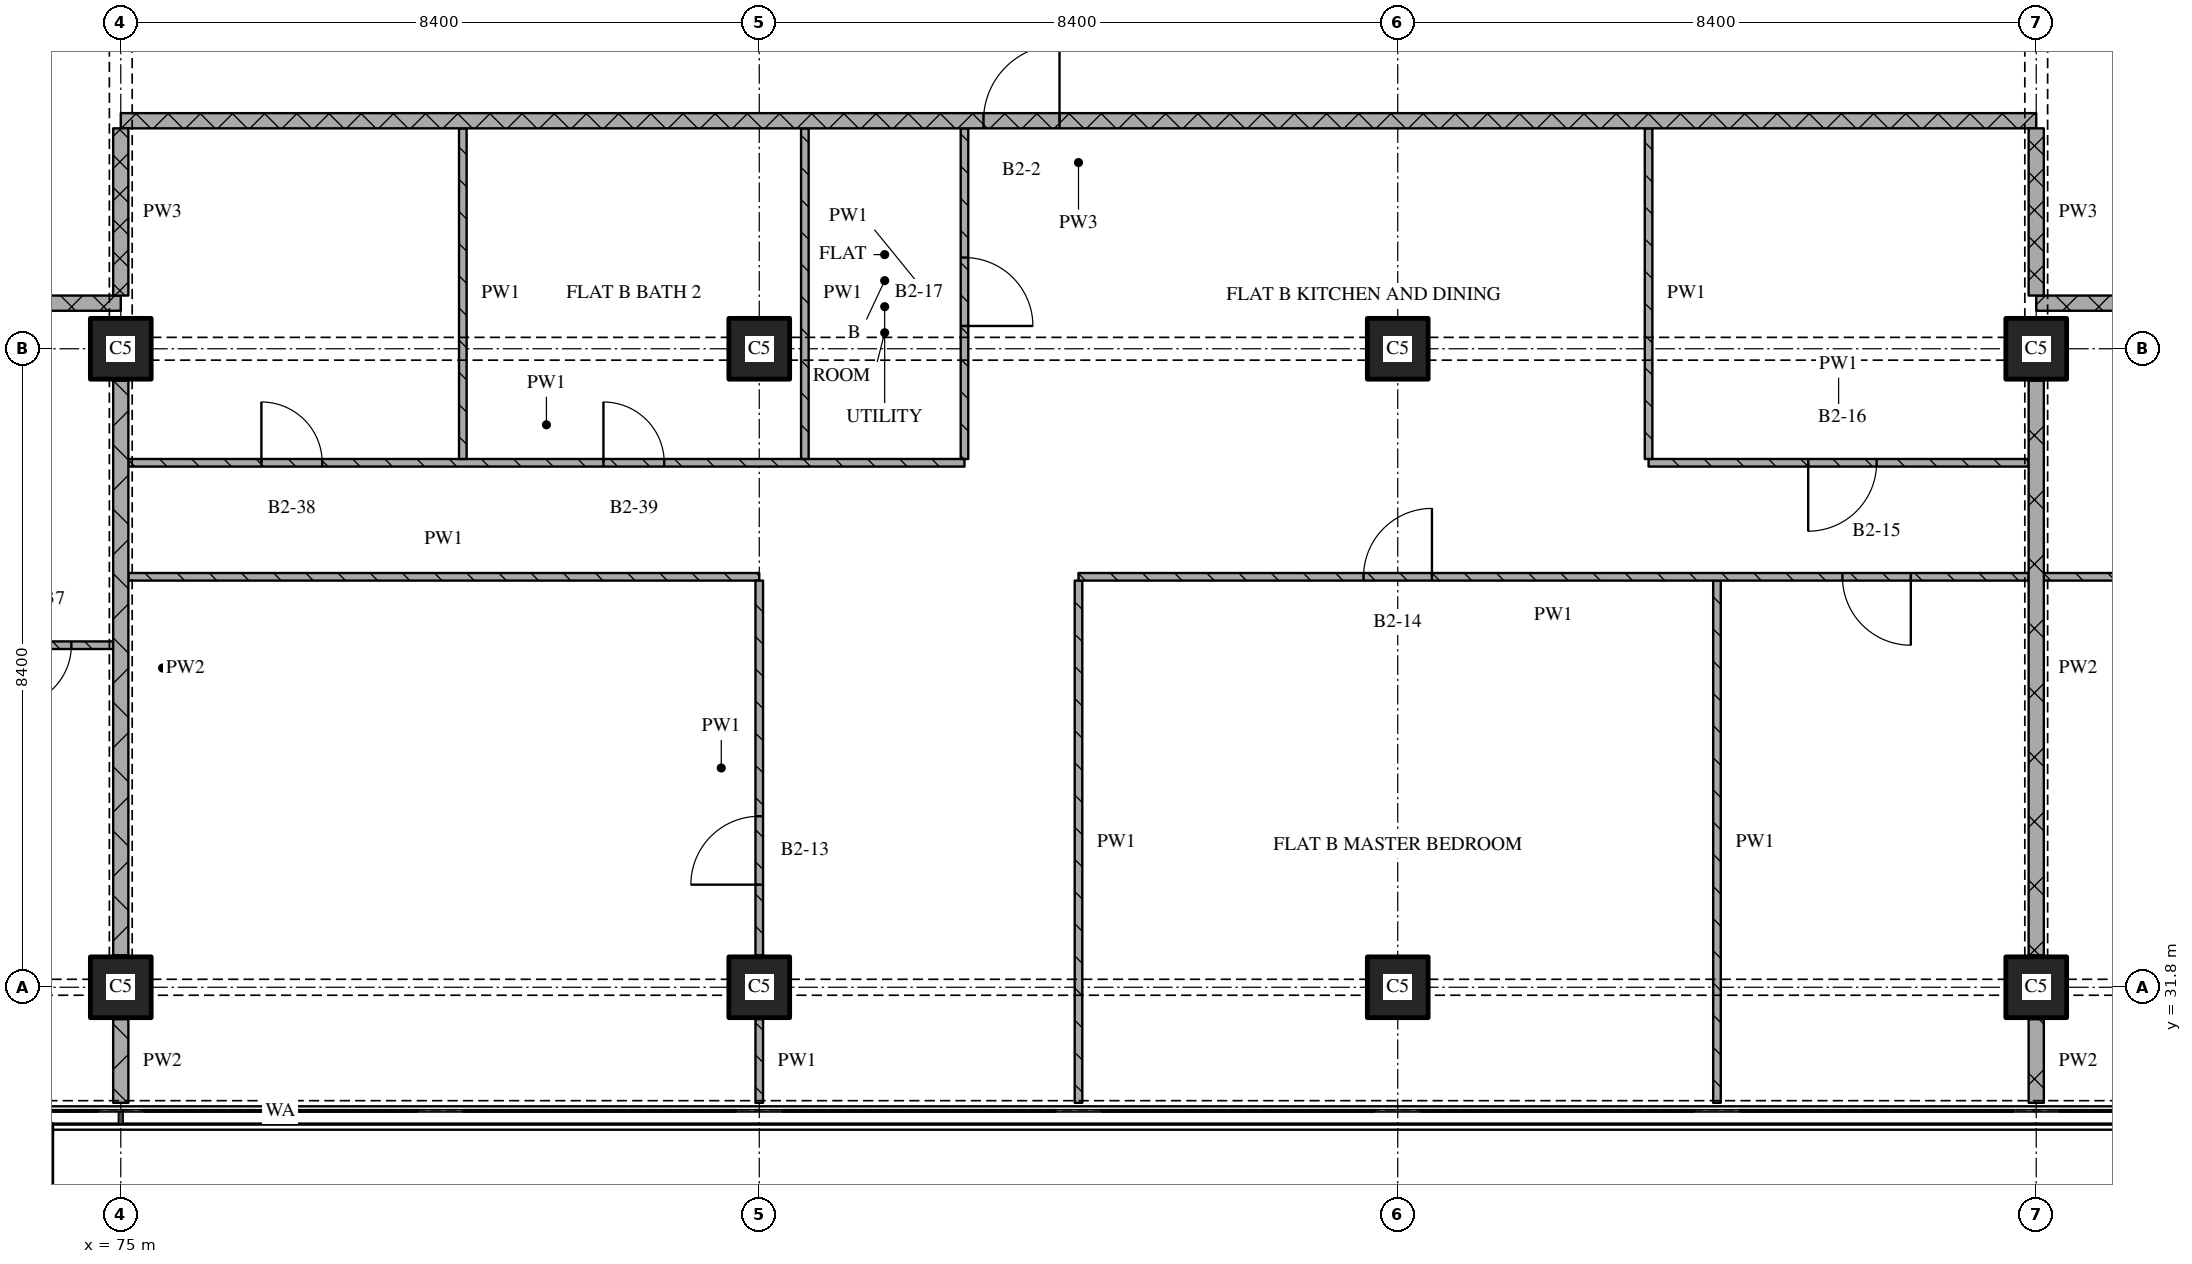
"""IFC4 building model, lengths in metres.
Left out: names, types, materials, properties, quantities, classifications, styles, units other than length and angle.
Written with IfcOpenShell. Run it as: python <this file> out.ifc"""

import sys

from ifc_helpers import new_model, si_unit, direction, frame, frame_2d, origin, origin_2d, place, context, subcontext, project, spatial, rectangle, extrude, element, fill, save


model = new_model("IFC4")
c1 = context("Model", 3, precision=1e-05, world=origin(), true_north=direction((0.0, 1.0)))
c2 = subcontext(c1, "Body", "Model", "MODEL_VIEW")
j1 = project(units=[si_unit("LENGTHUNIT", "METRE"), si_unit("PLANEANGLEUNIT", "RADIAN")], contexts=[c1])
p1 = place(None, origin())
s1 = spatial("IfcSite", under=j1, at=p1, CompositionType="ELEMENT")
p2 = place(p1, origin())
s2 = spatial("IfcBuilding", under=s1, at=p2, CompositionType="ELEMENT")
p3 = place(p2, frame((0.0, 0.0, 113.25)))
s3 = spatial("IfcBuildingStorey", under=s2, at=p3, CompositionType="ELEMENT", Elevation=113.25)
for number, where, z_axis, x_axis in (
    (1, (75.0, 31.8, 0.0), (0.0, 0.0, 1.0), (1.0, 0.0, 0.0)),
    (2, (75.0, 40.2, 0.0), (0.0, 0.0, 1.0), (1.0, 0.0, 0.0)),
    (3, (83.4, 31.8, 0.0), (0.0, 0.0, 1.0), (1.0, 0.0, 0.0)),
    (4, (83.4, 40.2, 0.0), (0.0, 0.0, 1.0), (1.0, 0.0, 0.0)),
    (5, (91.8, 31.8, 0.0), (0.0, 0.0, 1.0), (1.0, 0.0, 0.0)),
    (6, (91.8, 40.2, 0.0), (0.0, 0.0, 1.0), (1.0, 0.0, 0.0)),
    (7, (100.2, 31.8, 0.0), (0.0, 0.0, 1.0), (1.0, 0.0, 0.0)),
    (8, (100.2, 40.2, 0.0), (0.0, 0.0, 1.0), (1.0, 0.0, 0.0)),
):
    element("IfcColumn", number, at=place(p3, frame(where, z_axis=z_axis, x_axis=x_axis)), inside=s3, PredefinedType="COLUMN", context=c2, shape_type="SweptSolid", body=[
        extrude(rectangle(XDim=0.8, YDim=0.8, at=origin_2d()), origin(), (0.0, 0.0, 1.0), 3.6),
    ])
p4 = place(p3, frame((68.4, 36.3, 0.0), z_axis=(0.0, 0.0, 1.0), x_axis=(1.0, 0.0, 0.0)))
e9 = element("IfcWall", 9, at=p4, inside=s3, PredefinedType="PARTITIONING", context=c2, shape_type="SweptSolid", body=[
    extrude(rectangle(XDim=6.5, YDim=0.1, at=frame_2d((3.25, 0.0))), origin(), (0.0, 0.0, 1.0), 3.32),
])
p5 = place(p4, frame((5.15, 0.0, 0.0)))
e10 = element("IfcOpeningElement", 10, at=p5, cuts=e9, PredefinedType="OPENING", context=c2, shape_type="SweptSolid", body=[
    extrude(rectangle(XDim=0.8, YDim=2.1, at=frame_2d((0.4, 1.05))), frame((0.0, 0.06, 0.0), z_axis=(0.0, -1.0, 0.0), x_axis=(1.0, 0.0, 0.0)), (0.0, 0.0, 1.0), 0.12),
])
p6 = place(p3, frame((75.1, 37.2, 0.0), z_axis=(0.0, 0.0, 1.0), x_axis=(1.0, 0.0, 0.0)))
e11 = element("IfcWall", 11, at=p6, inside=s3, PredefinedType="PARTITIONING", context=c2, shape_type="SweptSolid", body=[
    extrude(rectangle(XDim=8.3, YDim=0.1, at=frame_2d((4.15, 0.0))), origin(), (0.0, 0.0, 1.0), 3.32),
])
p7 = place(p3, frame((75.1, 38.7, 0.0), z_axis=(0.0, 0.0, 1.0), x_axis=(1.0, 0.0, 0.0)))
e12 = element("IfcWall", 12, at=p7, inside=s3, PredefinedType="PARTITIONING", context=c2, shape_type="SweptSolid", body=[
    extrude(rectangle(XDim=11.0, YDim=0.1, at=frame_2d((5.5, 0.0))), origin(), (0.0, 0.0, 1.0), 3.32),
])
p8 = place(p7, frame((1.75, 0.0, 0.0)))
e13 = element("IfcOpeningElement", 13, at=p8, cuts=e12, PredefinedType="OPENING", context=c2, shape_type="SweptSolid", body=[
    extrude(rectangle(XDim=0.8, YDim=2.1, at=frame_2d((0.4, 1.05))), frame((0.0, 0.06, 0.0), z_axis=(0.0, -1.0, 0.0), x_axis=(1.0, 0.0, 0.0)), (0.0, 0.0, 1.0), 0.12),
])
p9 = place(p7, frame((6.25, 0.0, 0.0)))
e14 = element("IfcOpeningElement", 14, at=p9, cuts=e12, PredefinedType="OPENING", context=c2, shape_type="SweptSolid", body=[
    extrude(rectangle(XDim=0.8, YDim=2.1, at=frame_2d((0.4, 1.05))), frame((0.0, 0.06, 0.0), z_axis=(0.0, -1.0, 0.0), x_axis=(1.0, 0.0, 0.0)), (0.0, 0.0, 1.0), 0.12),
])
p10 = place(p3, frame((95.1, 38.7, 0.0), z_axis=(0.0, 0.0, 1.0), x_axis=(1.0, 0.0, 0.0)))
e15 = element("IfcWall", 15, at=p10, inside=s3, PredefinedType="PARTITIONING", context=c2, shape_type="SweptSolid", body=[
    extrude(rectangle(XDim=5.0, YDim=0.1, at=frame_2d((2.5, 0.0))), origin(), (0.0, 0.0, 1.0), 3.32),
])
p11 = place(p10, frame((2.1, 0.0, 0.0)))
e16 = element("IfcOpeningElement", 16, at=p11, cuts=e15, PredefinedType="OPENING", context=c2, shape_type="SweptSolid", body=[
    extrude(rectangle(XDim=0.9, YDim=2.1, at=frame_2d((0.45, 1.05))), frame((0.0, 0.06, 0.0), z_axis=(0.0, -1.0, 0.0), x_axis=(1.0, 0.0, 0.0)), (0.0, 0.0, 1.0), 0.12),
])
p12 = place(p3, frame((75.0, 40.8, 0.0), z_axis=(0.0, 0.0, 1.0), x_axis=(-1.0, 0.0, 0.0)))
e17 = element("IfcWall", 17, at=p12, inside=s3, PredefinedType="PARTITIONING", context=c2, shape_type="SweptSolid", body=[
    extrude(rectangle(XDim=24.18, YDim=0.2, at=frame_2d((12.09, 0.0))), origin(), (0.0, 0.0, 1.0), 3.32),
])
p13 = place(p12, frame((6.85, 0.0, 0.0)))
e18 = element("IfcOpeningElement", 18, at=p13, cuts=e17, PredefinedType="OPENING", context=c2, shape_type="SweptSolid", body=[
    extrude(rectangle(XDim=1.0, YDim=2.1, at=frame_2d((0.5, 1.05))), frame((0.0, 0.11, 0.0), z_axis=(0.0, -1.0, 0.0), x_axis=(1.0, 0.0, 0.0)), (0.0, 0.0, 1.0), 0.22),
])
p14 = place(p3, frame((124.38, 40.8, 0.0), z_axis=(0.0, 0.0, 1.0), x_axis=(-1.0, 0.0, 0.0)))
e19 = element("IfcWall", 19, at=p14, inside=s3, PredefinedType="PARTITIONING", context=c2, shape_type="SweptSolid", body=[
    extrude(rectangle(XDim=24.18, YDim=0.2, at=frame_2d((12.09, 0.0))), origin(), (0.0, 0.0, 1.0), 3.32),
])
p15 = place(p14, frame((12.13, 0.0, 0.0)))
e20 = element("IfcOpeningElement", 20, at=p15, cuts=e19, PredefinedType="OPENING", context=c2, shape_type="SweptSolid", body=[
    extrude(rectangle(XDim=1.0, YDim=2.1, at=frame_2d((0.5, 1.05))), frame((0.0, 0.11, 0.0), z_axis=(0.0, -1.0, 0.0), x_axis=(1.0, 0.0, 0.0)), (0.0, 0.0, 1.0), 0.22),
])
p16 = place(p3, frame((100.2, 43.2, 0.0), z_axis=(0.0, 0.0, 1.0), x_axis=(-1.0, 0.0, 0.0)))
e21 = element("IfcWall", 21, at=p16, inside=s3, PredefinedType="PARTITIONING", context=c2, shape_type="SweptSolid", body=[
    extrude(rectangle(XDim=25.2, YDim=0.2, at=frame_2d((12.6, 0.0))), origin(), (0.0, 0.0, 1.0), 3.32),
])
p17 = place(p16, frame((12.85, 0.0, 0.0)))
e22 = element("IfcOpeningElement", 22, at=p17, cuts=e21, PredefinedType="OPENING", context=c2, shape_type="SweptSolid", body=[
    extrude(rectangle(XDim=1.0, YDim=2.1, at=frame_2d((0.5, 1.05))), frame((0.0, 0.11, 0.0), z_axis=(0.0, -1.0, 0.0), x_axis=(1.0, 0.0, 0.0)), (0.0, 0.0, 1.0), 0.22),
])
p18 = place(p3, frame((75.0, 43.1, 0.0), z_axis=(0.0, 0.0, 1.0), x_axis=(0.0, -1.0, 0.0)))
e23 = element("IfcWall", 23, at=p18, inside=s3, PredefinedType="PARTITIONING", context=c2, shape_type="SweptSolid", body=[
    extrude(rectangle(XDim=2.2, YDim=0.2, at=frame_2d((1.1, 0.0))), origin(), (0.0, 0.0, 1.0), 2.43),
])
p19 = place(p3, frame((75.0, 31.38, 0.0), z_axis=(0.0, 0.0, 1.0), x_axis=(0.0, -1.0, 0.0)))
e24 = element("IfcWall", 24, at=p19, inside=s3, PredefinedType="PARTITIONING", context=c2, shape_type="SweptSolid", body=[
    extrude(rectangle(XDim=1.1, YDim=0.2, at=frame_2d((0.55, 0.0))), origin(), (0.0, 0.0, 1.0), 3.32),
])
p20 = place(p3, frame((75.0, 39.78, 0.0), z_axis=(0.0, 0.0, 1.0), x_axis=(0.0, -1.0, 0.0)))
e25 = element("IfcWall", 25, at=p20, inside=s3, PredefinedType="PARTITIONING", context=c2, shape_type="SweptSolid", body=[
    extrude(rectangle(XDim=7.56, YDim=0.2, at=frame_2d((3.78, 0.0))), origin(), (0.0, 0.0, 1.0), 2.83),
])
p21 = place(p3, frame((79.5, 43.1, 0.0), z_axis=(0.0, 0.0, 1.0), x_axis=(0.0, -1.0, 0.0)))
e26 = element("IfcWall", 26, at=p21, inside=s3, PredefinedType="PARTITIONING", context=c2, shape_type="SweptSolid", body=[
    extrude(rectangle(XDim=4.35, YDim=0.1, at=frame_2d((2.175, 0.0))), origin(), (0.0, 0.0, 1.0), 3.32),
])
p22 = place(p3, frame((83.4, 31.38, 0.0), z_axis=(0.0, 0.0, 1.0), x_axis=(0.0, -1.0, 0.0)))
e27 = element("IfcWall", 27, at=p22, inside=s3, PredefinedType="PARTITIONING", context=c2, shape_type="SweptSolid", body=[
    extrude(rectangle(XDim=1.1, YDim=0.1, at=frame_2d((0.55, 0.0))), origin(), (0.0, 0.0, 1.0), 3.32),
])
p23 = place(p3, frame((83.4, 32.22, 0.0), z_axis=(0.0, 0.0, 1.0), x_axis=(0.0, 1.0, 0.0)))
e28 = element("IfcWall", 28, at=p23, inside=s3, PredefinedType="PARTITIONING", context=c2, shape_type="SweptSolid", body=[
    extrude(rectangle(XDim=4.93, YDim=0.1, at=frame_2d((2.465, 0.0))), origin(), (0.0, 0.0, 1.0), 3.32),
])
p24 = place(p23, frame((0.93, 0.0, 0.0)))
e29 = element("IfcOpeningElement", 29, at=p24, cuts=e28, PredefinedType="OPENING", context=c2, shape_type="SweptSolid", body=[
    extrude(rectangle(XDim=0.9, YDim=2.1, at=frame_2d((0.45, 1.05))), frame((0.0, 0.06, 0.0), z_axis=(0.0, -1.0, 0.0), x_axis=(1.0, 0.0, 0.0)), (0.0, 0.0, 1.0), 0.12),
])
p25 = place(p3, frame((84.0, 43.1, 0.0), z_axis=(0.0, 0.0, 1.0), x_axis=(0.0, -1.0, 0.0)))
e30 = element("IfcWall", 30, at=p25, inside=s3, PredefinedType="PARTITIONING", context=c2, shape_type="SweptSolid", body=[
    extrude(rectangle(XDim=4.35, YDim=0.1, at=frame_2d((2.175, 0.0))), origin(), (0.0, 0.0, 1.0), 3.32),
])
p26 = place(p3, frame((86.1, 38.75, 0.0), z_axis=(0.0, 0.0, 1.0), x_axis=(0.0, 1.0, 0.0)))
e31 = element("IfcWall", 31, at=p26, inside=s3, PredefinedType="PARTITIONING", context=c2, shape_type="SweptSolid", body=[
    extrude(rectangle(XDim=4.35, YDim=0.1, at=frame_2d((2.175, 0.0))), origin(), (0.0, 0.0, 1.0), 3.32),
])
p27 = place(p26, frame((1.75, 0.0, 0.0)))
e32 = element("IfcOpeningElement", 32, at=p27, cuts=e31, PredefinedType="OPENING", context=c2, shape_type="SweptSolid", body=[
    extrude(rectangle(XDim=0.9, YDim=2.1, at=frame_2d((0.45, 1.05))), frame((0.0, 0.06, 0.0), z_axis=(0.0, -1.0, 0.0), x_axis=(1.0, 0.0, 0.0)), (0.0, 0.0, 1.0), 0.12),
])
p28 = place(p3, frame((87.6, 37.15, 0.0), z_axis=(0.0, 0.0, 1.0), x_axis=(0.0, -1.0, 0.0)))
e33 = element("IfcWall", 33, at=p28, inside=s3, PredefinedType="PARTITIONING", context=c2, shape_type="SweptSolid", body=[
    extrude(rectangle(XDim=6.87, YDim=0.1, at=frame_2d((3.435, 0.0))), origin(), (0.0, 0.0, 1.0), 3.32),
])
p29 = place(p3, frame((95.1, 43.1, 0.0), z_axis=(0.0, 0.0, 1.0), x_axis=(0.0, -1.0, 0.0)))
e34 = element("IfcWall", 34, at=p29, inside=s3, PredefinedType="PARTITIONING", context=c2, shape_type="SweptSolid", body=[
    extrude(rectangle(XDim=4.35, YDim=0.1, at=frame_2d((2.175, 0.0))), origin(), (0.0, 0.0, 1.0), 3.32),
])
p30 = place(p3, frame((96.0, 37.15, 0.0), z_axis=(0.0, 0.0, 1.0), x_axis=(0.0, -1.0, 0.0)))
e35 = element("IfcWall", 35, at=p30, inside=s3, PredefinedType="PARTITIONING", context=c2, shape_type="SweptSolid", body=[
    extrude(rectangle(XDim=6.87, YDim=0.1, at=frame_2d((3.435, 0.0))), origin(), (0.0, 0.0, 1.0), 3.32),
])
p31 = place(p3, frame((100.2, 43.1, 0.0), z_axis=(0.0, 0.0, 1.0), x_axis=(0.0, -1.0, 0.0)))
e36 = element("IfcWall", 36, at=p31, inside=s3, PredefinedType="PARTITIONING", context=c2, shape_type="SweptSolid", body=[
    extrude(rectangle(XDim=2.2, YDim=0.2, at=frame_2d((1.1, 0.0))), origin(), (0.0, 0.0, 1.0), 2.43),
])
p32 = place(p3, frame((100.2, 31.38, 0.0), z_axis=(0.0, 0.0, 1.0), x_axis=(0.0, -1.0, 0.0)))
e37 = element("IfcWall", 37, at=p32, inside=s3, PredefinedType="PARTITIONING", context=c2, shape_type="SweptSolid", body=[
    extrude(rectangle(XDim=1.1, YDim=0.2, at=frame_2d((0.55, 0.0))), origin(), (0.0, 0.0, 1.0), 3.32),
])
p33 = place(p3, frame((100.2, 39.78, 0.0), z_axis=(0.0, 0.0, 1.0), x_axis=(0.0, -1.0, 0.0)))
e38 = element("IfcWall", 38, at=p33, inside=s3, PredefinedType="PARTITIONING", context=c2, shape_type="SweptSolid", body=[
    extrude(rectangle(XDim=7.56, YDim=0.2, at=frame_2d((3.78, 0.0))), origin(), (0.0, 0.0, 1.0), 2.83),
])
p34 = place(p3, frame((100.1, 37.2, 0.0), z_axis=(0.0, 0.0, 1.0), x_axis=(-1.0, 0.0, 0.0)))
e39 = element("IfcWall", 39, at=p34, inside=s3, PredefinedType="PARTITIONING", context=c2, shape_type="SweptSolid", body=[
    extrude(rectangle(XDim=12.5, YDim=0.1, at=frame_2d((6.25, 0.0))), origin(), (0.0, 0.0, 1.0), 3.32),
])
p35 = place(p34, frame((1.55, 0.0, 0.0)))
e40 = element("IfcOpeningElement", 40, at=p35, cuts=e39, PredefinedType="OPENING", context=c2, shape_type="SweptSolid", body=[
    extrude(rectangle(XDim=0.9, YDim=2.1, at=frame_2d((0.45, 1.05))), frame((0.0, 0.06, 0.0), z_axis=(0.0, -1.0, 0.0), x_axis=(1.0, 0.0, 0.0)), (0.0, 0.0, 1.0), 0.12),
])
p36 = place(p34, frame((7.85, 0.0, 0.0)))
e41 = element("IfcOpeningElement", 41, at=p36, cuts=e39, PredefinedType="OPENING", context=c2, shape_type="SweptSolid", body=[
    extrude(rectangle(XDim=0.9, YDim=2.1, at=frame_2d((0.45, 1.05))), frame((0.0, 0.06, 0.0), z_axis=(0.0, -1.0, 0.0), x_axis=(1.0, 0.0, 0.0)), (0.0, 0.0, 1.0), 0.12),
])
p37 = place(p3, frame((100.3, 37.2, 0.0), z_axis=(0.0, 0.0, 1.0), x_axis=(1.0, 0.0, 0.0)))
e42 = element("IfcWall", 42, at=p37, inside=s3, PredefinedType="PARTITIONING", context=c2, shape_type="SweptSolid", body=[
    extrude(rectangle(XDim=10.7, YDim=0.1, at=frame_2d((5.35, 0.0))), origin(), (0.0, 0.0, 1.0), 3.32),
])
p38 = place(p37, frame((1.75, 0.0, 0.0)))
e43 = element("IfcOpeningElement", 43, at=p38, cuts=e42, PredefinedType="OPENING", context=c2, shape_type="SweptSolid", body=[
    extrude(rectangle(XDim=0.8, YDim=2.1, at=frame_2d((0.4, 1.05))), frame((0.0, 0.06, 0.0), z_axis=(0.0, -1.0, 0.0), x_axis=(1.0, 0.0, 0.0)), (0.0, 0.0, 1.0), 0.12),
])
p39 = place(p37, frame((6.25, 0.0, 0.0)))
e44 = element("IfcOpeningElement", 44, at=p39, cuts=e42, PredefinedType="OPENING", context=c2, shape_type="SweptSolid", body=[
    extrude(rectangle(XDim=0.8, YDim=2.1, at=frame_2d((0.4, 1.05))), frame((0.0, 0.06, 0.0), z_axis=(0.0, -1.0, 0.0), x_axis=(1.0, 0.0, 0.0)), (0.0, 0.0, 1.0), 0.12),
])
p40 = place(p37, frame((9.35, 0.0, 0.0)))
e45 = element("IfcOpeningElement", 45, at=p40, cuts=e42, PredefinedType="OPENING", context=c2, shape_type="SweptSolid", body=[
    extrude(rectangle(XDim=0.9, YDim=2.1, at=frame_2d((0.45, 1.05))), frame((0.0, 0.06, 0.0), z_axis=(0.0, -1.0, 0.0), x_axis=(1.0, 0.0, 0.0)), (0.0, 0.0, 1.0), 0.12),
])
p41 = place(p5, origin())
e46 = element("IfcDoor", 46, at=p41, inside=s3, OperationType="SINGLE_SWING_RIGHT", PredefinedType="DOOR", context=c2, shape_type="SweptSolid", body=[
    extrude(rectangle(XDim=0.8, YDim=2.1, at=frame_2d((0.4, 1.05))), frame((0.0, 0.025, 0.0), z_axis=(0.0, -1.0, 0.0), x_axis=(1.0, 0.0, 0.0)), (0.0, 0.0, 1.0), 0.05),
])
fill(e10, e46)
p42 = place(p8, origin())
e47 = element("IfcDoor", 47, at=p42, inside=s3, OperationType="SINGLE_SWING_LEFT", PredefinedType="DOOR", context=c2, shape_type="SweptSolid", body=[
    extrude(rectangle(XDim=0.8, YDim=2.1, at=frame_2d((0.4, 1.05))), frame((0.0, 0.025, 0.0), z_axis=(0.0, -1.0, 0.0), x_axis=(1.0, 0.0, 0.0)), (0.0, 0.0, 1.0), 0.05),
])
fill(e13, e47)
p43 = place(p9, origin())
e48 = element("IfcDoor", 48, at=p43, inside=s3, OperationType="SINGLE_SWING_LEFT", PredefinedType="DOOR", context=c2, shape_type="SweptSolid", body=[
    extrude(rectangle(XDim=0.8, YDim=2.1, at=frame_2d((0.4, 1.05))), frame((0.0, 0.025, 0.0), z_axis=(0.0, -1.0, 0.0), x_axis=(1.0, 0.0, 0.0)), (0.0, 0.0, 1.0), 0.05),
])
fill(e14, e48)
p44 = place(p11, origin())
e49 = element("IfcDoor", 49, at=p44, inside=s3, OperationType="SINGLE_SWING_RIGHT", PredefinedType="DOOR", context=c2, shape_type="SweptSolid", body=[
    extrude(rectangle(XDim=0.9, YDim=2.1, at=frame_2d((0.45, 1.05))), frame((0.0, 0.025, 0.0), z_axis=(0.0, -1.0, 0.0), x_axis=(1.0, 0.0, 0.0)), (0.0, 0.0, 1.0), 0.05),
])
fill(e16, e49)
p45 = place(p17, origin())
e50 = element("IfcDoor", 50, at=p45, inside=s3, OperationType="SINGLE_SWING_RIGHT", PredefinedType="DOOR", context=c2, shape_type="SweptSolid", body=[
    extrude(rectangle(XDim=1.0, YDim=2.1, at=frame_2d((0.5, 1.05))), frame((0.0, 0.025, 0.0), z_axis=(0.0, -1.0, 0.0), x_axis=(1.0, 0.0, 0.0)), (0.0, 0.0, 1.0), 0.05),
])
fill(e22, e50)
p46 = place(p24, origin())
e51 = element("IfcDoor", 51, at=p46, inside=s3, OperationType="SINGLE_SWING_LEFT", PredefinedType="DOOR", context=c2, shape_type="SweptSolid", body=[
    extrude(rectangle(XDim=0.9, YDim=2.1, at=frame_2d((0.45, 1.05))), frame((0.0, 0.025, 0.0), z_axis=(0.0, -1.0, 0.0), x_axis=(1.0, 0.0, 0.0)), (0.0, 0.0, 1.0), 0.05),
])
fill(e29, e51)
p47 = place(p27, origin())
e52 = element("IfcDoor", 52, at=p47, inside=s3, OperationType="SINGLE_SWING_RIGHT", PredefinedType="DOOR", context=c2, shape_type="SweptSolid", body=[
    extrude(rectangle(XDim=0.9, YDim=2.1, at=frame_2d((0.45, 1.05))), frame((0.0, 0.025, 0.0), z_axis=(0.0, -1.0, 0.0), x_axis=(1.0, 0.0, 0.0)), (0.0, 0.0, 1.0), 0.05),
])
fill(e32, e52)
p48 = place(p35, origin())
e53 = element("IfcDoor", 53, at=p48, inside=s3, OperationType="SINGLE_SWING_LEFT", PredefinedType="DOOR", context=c2, shape_type="SweptSolid", body=[
    extrude(rectangle(XDim=0.9, YDim=2.1, at=frame_2d((0.45, 1.05))), frame((0.0, 0.025, 0.0), z_axis=(0.0, -1.0, 0.0), x_axis=(1.0, 0.0, 0.0)), (0.0, 0.0, 1.0), 0.05),
])
fill(e40, e53)
p49 = place(p36, origin())
e54 = element("IfcDoor", 54, at=p49, inside=s3, OperationType="SINGLE_SWING_RIGHT", PredefinedType="DOOR", context=c2, shape_type="SweptSolid", body=[
    extrude(rectangle(XDim=0.9, YDim=2.1, at=frame_2d((0.45, 1.05))), frame((0.0, 0.025, 0.0), z_axis=(0.0, -1.0, 0.0), x_axis=(1.0, 0.0, 0.0)), (0.0, 0.0, 1.0), 0.05),
])
fill(e41, e54)
save(model, sys.argv[1])
